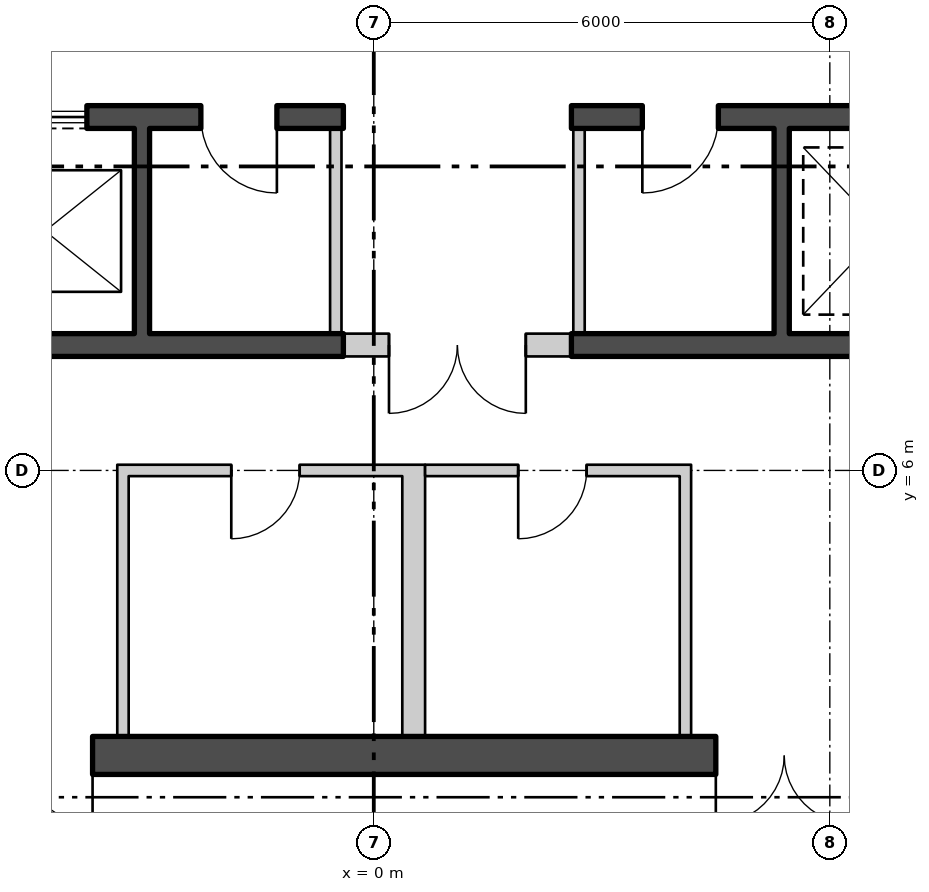
"""IFC4 building model, lengths in metres.
Left out: names, types, materials, properties, quantities, classifications, styles, units other than length and angle.
Written with IfcOpenShell. Run it as: python <this file> out.ifc"""

import sys

from ifc_helpers import new_model, si_unit, direction, frame, frame_2d, origin, place, context, subcontext, project, spatial, polyline, rectangle, outline, extrude, element, fill, save


model = new_model("IFC4")
c1 = context("Model", 3, precision=1e-05, world=origin(), true_north=direction((0.0, 1.0)))
c2 = subcontext(c1, "Body", "Model", "MODEL_VIEW")
j1 = project(units=[si_unit("LENGTHUNIT", "METRE"), si_unit("PLANEANGLEUNIT", "RADIAN")], contexts=[c1])
p1 = place(None, origin())
s1 = spatial("IfcSite", under=j1, at=p1, CompositionType="ELEMENT")
p2 = place(p1, origin())
s2 = spatial("IfcBuilding", under=s1, at=p2, CompositionType="ELEMENT")
p3 = place(p2, frame((0.0, 0.0, 163.2)))
s3 = spatial("IfcBuildingStorey", under=s2, at=p3, CompositionType="ELEMENT", Elevation=163.2)
p4 = place(p3, frame((-26.925, 12.951, -0.18), z_axis=(0.0, 0.0, 1.0), x_axis=(0.499999764979, -0.866025539474, 0.0)))
e1 = element("IfcWall", 1, at=p4, inside=s3, PredefinedType="SOLIDWALL", context=c2, shape_type="SweptSolid", body=[
    extrude(outline(polyline([(-0.13, -0.225), (45.87, -0.225), (45.61, 0.225), (0.13, 0.225), (-0.13, -0.225)])), origin(), (0.0, 0.0, 1.0), 3.68),
])
p5 = place(p4, frame((1.424, 0.0, 1.08)))
e2 = element("IfcOpeningElement", 2, at=p5, cuts=e1, PredefinedType="OPENING", context=c2, shape_type="SweptSolid", body=[
    extrude(rectangle(XDim=2.4, YDim=2.0, at=frame_2d((1.2, 1.0))), frame((0.0, 0.235, 0.0), z_axis=(0.0, -1.0, 0.0), x_axis=(1.0, 0.0, 0.0)), (0.0, 0.0, 1.0), 0.47),
])
p6 = place(p4, frame((5.893, 0.0, 1.08)))
e3 = element("IfcOpeningElement", 3, at=p6, cuts=e1, PredefinedType="OPENING", context=c2, shape_type="SweptSolid", body=[
    extrude(rectangle(XDim=2.4, YDim=2.0, at=frame_2d((1.2, 1.0))), frame((0.0, 0.235, 0.0), z_axis=(0.0, -1.0, 0.0), x_axis=(1.0, 0.0, 0.0)), (0.0, 0.0, 1.0), 0.47),
])
p7 = place(p4, frame((10.401, 0.0, 1.08)))
e4 = element("IfcOpeningElement", 4, at=p7, cuts=e1, PredefinedType="OPENING", context=c2, shape_type="SweptSolid", body=[
    extrude(rectangle(XDim=2.4, YDim=2.0, at=frame_2d((1.2, 1.0))), frame((0.0, 0.235, 0.0), z_axis=(0.0, -1.0, 0.0), x_axis=(1.0, 0.0, 0.0)), (0.0, 0.0, 1.0), 0.47),
])
p8 = place(p4, frame((14.909, 0.0, 1.08)))
e5 = element("IfcOpeningElement", 5, at=p8, cuts=e1, PredefinedType="OPENING", context=c2, shape_type="SweptSolid", body=[
    extrude(rectangle(XDim=2.4, YDim=2.0, at=frame_2d((1.2, 1.0))), frame((0.0, 0.235, 0.0), z_axis=(0.0, -1.0, 0.0), x_axis=(1.0, 0.0, 0.0)), (0.0, 0.0, 1.0), 0.47),
])
p9 = place(p4, frame((19.416, 0.0, 1.08)))
e6 = element("IfcOpeningElement", 6, at=p9, cuts=e1, PredefinedType="OPENING", context=c2, shape_type="SweptSolid", body=[
    extrude(rectangle(XDim=2.4, YDim=2.0, at=frame_2d((1.2, 1.0))), frame((0.0, 0.235, 0.0), z_axis=(0.0, -1.0, 0.0), x_axis=(1.0, 0.0, 0.0)), (0.0, 0.0, 1.0), 0.47),
])
p10 = place(p4, frame((23.924, 0.0, 1.08)))
e7 = element("IfcOpeningElement", 7, at=p10, cuts=e1, PredefinedType="OPENING", context=c2, shape_type="SweptSolid", body=[
    extrude(rectangle(XDim=2.4, YDim=2.0, at=frame_2d((1.2, 1.0))), frame((0.0, 0.235, 0.0), z_axis=(0.0, -1.0, 0.0), x_axis=(1.0, 0.0, 0.0)), (0.0, 0.0, 1.0), 0.47),
])
p11 = place(p4, frame((28.431, 0.0, 1.08)))
e8 = element("IfcOpeningElement", 8, at=p11, cuts=e1, PredefinedType="OPENING", context=c2, shape_type="SweptSolid", body=[
    extrude(rectangle(XDim=2.4, YDim=2.0, at=frame_2d((1.2, 1.0))), frame((0.0, 0.235, 0.0), z_axis=(0.0, -1.0, 0.0), x_axis=(1.0, 0.0, 0.0)), (0.0, 0.0, 1.0), 0.47),
])
p12 = place(p4, frame((32.939, 0.0, 1.08)))
e9 = element("IfcOpeningElement", 9, at=p12, cuts=e1, PredefinedType="OPENING", context=c2, shape_type="SweptSolid", body=[
    extrude(rectangle(XDim=2.4, YDim=2.0, at=frame_2d((1.2, 1.0))), frame((0.0, 0.235, 0.0), z_axis=(0.0, -1.0, 0.0), x_axis=(1.0, 0.0, 0.0)), (0.0, 0.0, 1.0), 0.47),
])
p13 = place(p4, frame((37.447, 0.0, 1.08)))
e10 = element("IfcOpeningElement", 10, at=p13, cuts=e1, PredefinedType="OPENING", context=c2, shape_type="SweptSolid", body=[
    extrude(rectangle(XDim=2.4, YDim=2.0, at=frame_2d((1.2, 1.0))), frame((0.0, 0.235, 0.0), z_axis=(0.0, -1.0, 0.0), x_axis=(1.0, 0.0, 0.0)), (0.0, 0.0, 1.0), 0.47),
])
p14 = place(p4, frame((41.916, 0.0, 1.08)))
e11 = element("IfcOpeningElement", 11, at=p14, cuts=e1, PredefinedType="OPENING", context=c2, shape_type="SweptSolid", body=[
    extrude(rectangle(XDim=2.4, YDim=2.0, at=frame_2d((1.2, 1.0))), frame((0.0, 0.235, 0.0), z_axis=(0.0, -1.0, 0.0), x_axis=(1.0, 0.0, 0.0)), (0.0, 0.0, 1.0), 0.47),
])
p15 = place(p3, frame((4.055, -26.661, -0.18), z_axis=(0.0, 0.0, 1.0), x_axis=(0.499999764979, 0.866025539474, 0.0)))
e12 = element("IfcWall", 12, at=p15, inside=s3, PredefinedType="SOLIDWALL", context=c2, shape_type="SweptSolid", body=[
    extrude(outline(polyline([(-0.13, -0.225), (45.87, -0.225), (45.61, 0.225), (0.13, 0.225), (-0.13, -0.225)])), origin(), (0.0, 0.0, 1.0), 3.68),
])
p16 = place(p15, frame((1.424, 0.0, 1.08)))
e13 = element("IfcOpeningElement", 13, at=p16, cuts=e12, PredefinedType="OPENING", context=c2, shape_type="SweptSolid", body=[
    extrude(rectangle(XDim=2.4, YDim=2.0, at=frame_2d((1.2, 1.0))), frame((0.0, 0.235, 0.0), z_axis=(0.0, -1.0, 0.0), x_axis=(1.0, 0.0, 0.0)), (0.0, 0.0, 1.0), 0.47),
])
p17 = place(p15, frame((5.893, 0.0, 1.08)))
e14 = element("IfcOpeningElement", 14, at=p17, cuts=e12, PredefinedType="OPENING", context=c2, shape_type="SweptSolid", body=[
    extrude(rectangle(XDim=2.4, YDim=2.0, at=frame_2d((1.2, 1.0))), frame((0.0, 0.235, 0.0), z_axis=(0.0, -1.0, 0.0), x_axis=(1.0, 0.0, 0.0)), (0.0, 0.0, 1.0), 0.47),
])
p18 = place(p15, frame((10.401, 0.0, 1.08)))
e15 = element("IfcOpeningElement", 15, at=p18, cuts=e12, PredefinedType="OPENING", context=c2, shape_type="SweptSolid", body=[
    extrude(rectangle(XDim=2.4, YDim=2.0, at=frame_2d((1.2, 1.0))), frame((0.0, 0.235, 0.0), z_axis=(0.0, -1.0, 0.0), x_axis=(1.0, 0.0, 0.0)), (0.0, 0.0, 1.0), 0.47),
])
p19 = place(p15, frame((14.909, 0.0, 1.08)))
e16 = element("IfcOpeningElement", 16, at=p19, cuts=e12, PredefinedType="OPENING", context=c2, shape_type="SweptSolid", body=[
    extrude(rectangle(XDim=2.4, YDim=2.0, at=frame_2d((1.2, 1.0))), frame((0.0, 0.235, 0.0), z_axis=(0.0, -1.0, 0.0), x_axis=(1.0, 0.0, 0.0)), (0.0, 0.0, 1.0), 0.47),
])
p20 = place(p15, frame((19.416, 0.0, 1.08)))
e17 = element("IfcOpeningElement", 17, at=p20, cuts=e12, PredefinedType="OPENING", context=c2, shape_type="SweptSolid", body=[
    extrude(rectangle(XDim=2.4, YDim=2.0, at=frame_2d((1.2, 1.0))), frame((0.0, 0.235, 0.0), z_axis=(0.0, -1.0, 0.0), x_axis=(1.0, 0.0, 0.0)), (0.0, 0.0, 1.0), 0.47),
])
p21 = place(p15, frame((23.924, 0.0, 1.08)))
e18 = element("IfcOpeningElement", 18, at=p21, cuts=e12, PredefinedType="OPENING", context=c2, shape_type="SweptSolid", body=[
    extrude(rectangle(XDim=2.4, YDim=2.0, at=frame_2d((1.2, 1.0))), frame((0.0, 0.235, 0.0), z_axis=(0.0, -1.0, 0.0), x_axis=(1.0, 0.0, 0.0)), (0.0, 0.0, 1.0), 0.47),
])
p22 = place(p15, frame((28.431, 0.0, 1.08)))
e19 = element("IfcOpeningElement", 19, at=p22, cuts=e12, PredefinedType="OPENING", context=c2, shape_type="SweptSolid", body=[
    extrude(rectangle(XDim=2.4, YDim=2.0, at=frame_2d((1.2, 1.0))), frame((0.0, 0.235, 0.0), z_axis=(0.0, -1.0, 0.0), x_axis=(1.0, 0.0, 0.0)), (0.0, 0.0, 1.0), 0.47),
])
p23 = place(p15, frame((32.939, 0.0, 1.08)))
e20 = element("IfcOpeningElement", 20, at=p23, cuts=e12, PredefinedType="OPENING", context=c2, shape_type="SweptSolid", body=[
    extrude(rectangle(XDim=2.4, YDim=2.0, at=frame_2d((1.2, 1.0))), frame((0.0, 0.235, 0.0), z_axis=(0.0, -1.0, 0.0), x_axis=(1.0, 0.0, 0.0)), (0.0, 0.0, 1.0), 0.47),
])
p24 = place(p15, frame((37.447, 0.0, 1.08)))
e21 = element("IfcOpeningElement", 21, at=p24, cuts=e12, PredefinedType="OPENING", context=c2, shape_type="SweptSolid", body=[
    extrude(rectangle(XDim=2.4, YDim=2.0, at=frame_2d((1.2, 1.0))), frame((0.0, 0.235, 0.0), z_axis=(0.0, -1.0, 0.0), x_axis=(1.0, 0.0, 0.0)), (0.0, 0.0, 1.0), 0.47),
])
p25 = place(p15, frame((41.916, 0.0, 1.08)))
e22 = element("IfcOpeningElement", 22, at=p25, cuts=e12, PredefinedType="OPENING", context=c2, shape_type="SweptSolid", body=[
    extrude(rectangle(XDim=2.4, YDim=2.0, at=frame_2d((1.2, 1.0))), frame((0.0, 0.235, 0.0), z_axis=(0.0, -1.0, 0.0), x_axis=(1.0, 0.0, 0.0)), (0.0, 0.0, 1.0), 0.47),
])
p26 = place(p3, frame((-16.2, 2.25, 0.0), z_axis=(0.0, 0.0, 1.0), x_axis=(1.0, 0.0, 0.0)))
e23 = element("IfcWall", 23, at=p26, inside=s3, PredefinedType="SHEAR", context=c2, shape_type="SweptSolid", body=[
    extrude(rectangle(XDim=32.4, YDim=0.5, at=frame_2d((16.2, 0.0))), origin(), (0.0, 0.0, 1.0), 3.7),
])
p27 = place(p26, frame((10.7, 0.0, 0.0)))
e24 = element("IfcOpeningElement", 24, at=p27, cuts=e23, PredefinedType="OPENING", context=c2, shape_type="SweptSolid", body=[
    extrude(rectangle(XDim=1.8, YDim=2.4, at=frame_2d((0.9, 1.2))), frame((0.0, 0.26, 0.0), z_axis=(0.0, -1.0, 0.0), x_axis=(1.0, 0.0, 0.0)), (0.0, 0.0, 1.0), 0.52),
])
p28 = place(p26, frame((20.7, 0.0, 0.0)))
e25 = element("IfcOpeningElement", 25, at=p28, cuts=e23, PredefinedType="OPENING", context=c2, shape_type="SweptSolid", body=[
    extrude(rectangle(XDim=1.8, YDim=2.4, at=frame_2d((0.9, 1.2))), frame((0.0, 0.26, 0.0), z_axis=(0.0, -1.0, 0.0), x_axis=(1.0, 0.0, 0.0)), (0.0, 0.0, 1.0), 0.52),
])
p29 = place(p3, frame((-10.7, 10.65, 0.0), z_axis=(0.0, 0.0, 1.0), x_axis=(1.0, 0.0, 0.0)))
e26 = element("IfcWall", 26, at=p29, inside=s3, PredefinedType="SHEAR", context=c2, shape_type="SweptSolid", body=[
    extrude(rectangle(XDim=10.3, YDim=0.3, at=frame_2d((5.15, 0.0))), origin(), (0.0, 0.0, 1.0), 3.7),
])
p30 = place(p29, frame((0.675, 0.0, 0.0)))
e27 = element("IfcOpeningElement", 27, at=p30, cuts=e26, PredefinedType="OPENING", context=c2, shape_type="SweptSolid", body=[
    extrude(rectangle(XDim=1.1, YDim=2.1, at=frame_2d((0.55, 1.05))), frame((0.0, 0.16, 0.0), z_axis=(0.0, -1.0, 0.0), x_axis=(1.0, 0.0, 0.0)), (0.0, 0.0, 1.0), 0.32),
])
p31 = place(p29, frame((3.275, 0.0, 0.0)))
e28 = element("IfcOpeningElement", 28, at=p31, cuts=e26, PredefinedType="OPENING", context=c2, shape_type="SweptSolid", body=[
    extrude(rectangle(XDim=1.1, YDim=2.1, at=frame_2d((0.55, 1.05))), frame((0.0, 0.16, 0.0), z_axis=(0.0, -1.0, 0.0), x_axis=(1.0, 0.0, 0.0)), (0.0, 0.0, 1.0), 0.32),
])
p32 = place(p29, frame((5.825, 0.0, 0.0)))
e29 = element("IfcOpeningElement", 29, at=p32, cuts=e26, PredefinedType="OPENING", context=c2, shape_type="SweptSolid", body=[
    extrude(rectangle(XDim=1.1, YDim=2.1, at=frame_2d((0.55, 1.05))), frame((0.0, 0.16, 0.0), z_axis=(0.0, -1.0, 0.0), x_axis=(1.0, 0.0, 0.0)), (0.0, 0.0, 1.0), 0.32),
])
p33 = place(p29, frame((8.425, 0.0, 0.0)))
e30 = element("IfcOpeningElement", 30, at=p33, cuts=e26, PredefinedType="OPENING", context=c2, shape_type="SweptSolid", body=[
    extrude(rectangle(XDim=1.0, YDim=2.1, at=frame_2d((0.5, 1.05))), frame((0.0, 0.16, 0.0), z_axis=(0.0, -1.0, 0.0), x_axis=(1.0, 0.0, 0.0)), (0.0, 0.0, 1.0), 0.32),
])
p34 = place(p3, frame((-10.7, 7.65, 0.0), z_axis=(0.0, 0.0, 1.0), x_axis=(1.0, 0.0, 0.0)))
e31 = element("IfcWall", 31, at=p34, inside=s3, PredefinedType="SHEAR", context=c2, shape_type="SweptSolid", body=[
    extrude(rectangle(XDim=10.3, YDim=0.3, at=frame_2d((5.15, 0.0))), origin(), (0.0, 0.0, 1.0), 3.7),
])
p35 = place(p3, frame((2.6, 10.65, 0.0), z_axis=(0.0, 0.0, 1.0), x_axis=(1.0, 0.0, 0.0)))
e32 = element("IfcWall", 32, at=p35, inside=s3, PredefinedType="SHEAR", context=c2, shape_type="SweptSolid", body=[
    extrude(rectangle(XDim=8.1, YDim=0.3, at=frame_2d((4.05, 0.0))), origin(), (0.0, 0.0, 1.0), 3.7),
])
p36 = place(p35, frame((0.933, 0.0, 0.0)))
e33 = element("IfcOpeningElement", 33, at=p36, cuts=e32, PredefinedType="OPENING", context=c2, shape_type="SweptSolid", body=[
    extrude(rectangle(XDim=1.0, YDim=2.1, at=frame_2d((0.5, 1.05))), frame((0.0, 0.16, 0.0), z_axis=(0.0, -1.0, 0.0), x_axis=(1.0, 0.0, 0.0)), (0.0, 0.0, 1.0), 0.32),
])
p37 = place(p3, frame((2.6, 7.65, 0.0), z_axis=(0.0, 0.0, 1.0), x_axis=(1.0, 0.0, 0.0)))
e34 = element("IfcWall", 34, at=p37, inside=s3, PredefinedType="SHEAR", context=c2, shape_type="SweptSolid", body=[
    extrude(rectangle(XDim=8.1, YDim=0.3, at=frame_2d((4.05, 0.0))), origin(), (0.0, 0.0, 1.0), 3.7),
])
p38 = place(p3, frame((-3.05, 7.8, 0.0), z_axis=(0.0, 0.0, 1.0), x_axis=(0.0, 1.0, 0.0)))
e35 = element("IfcWall", 35, at=p38, inside=s3, PredefinedType="SHEAR", context=c2, shape_type="SweptSolid", body=[
    extrude(rectangle(XDim=2.7, YDim=0.2, at=frame_2d((1.35, 0.0))), origin(), (0.0, 0.0, 1.0), 3.7),
])
for number, where, z_axis, x_axis in (
    (36, (-0.5, 7.8, 0.0), (0.0, 0.0, 1.0), (0.0, 1.0, 0.0)),
    (37, (2.7, 7.8, 0.0), (0.0, 0.0, 1.0), (0.0, 1.0, 0.0)),
):
    element("IfcWall", number, at=place(p3, frame(where, z_axis=z_axis, x_axis=x_axis)), inside=s3, PredefinedType="PARTITIONING", context=c2, shape_type="SweptSolid", body=[
        extrude(rectangle(XDim=2.7, YDim=0.15, at=frame_2d((1.35, 0.0))), origin(), (0.0, 0.0, 1.0), 3.7),
    ])
p39 = place(p3, frame((5.367, 7.8, 0.0), z_axis=(0.0, 0.0, 1.0), x_axis=(0.0, 1.0, 0.0)))
e38 = element("IfcWall", 38, at=p39, inside=s3, PredefinedType="SHEAR", context=c2, shape_type="SweptSolid", body=[
    extrude(rectangle(XDim=2.7, YDim=0.2, at=frame_2d((1.35, 0.0))), origin(), (0.0, 0.0, 1.0), 3.7),
])
for number, where, z_axis, x_axis in (
    (39, (-3.3, 2.5, 0.0), (0.0, 0.0, 1.0), (0.0, 1.0, 0.0)),
    (40, (0.45, 2.5, 0.0), (0.0, 0.0, 1.0), (0.0, 1.0, 0.0)),
):
    element("IfcWall", number, at=place(p3, frame(where, z_axis=z_axis, x_axis=x_axis)), inside=s3, PredefinedType="PARTITIONING", context=c2, shape_type="SweptSolid", body=[
        extrude(rectangle(XDim=3.575, YDim=0.15, at=frame_2d((1.788, 0.0))), origin(), (0.0, 0.0, 1.0), 3.7),
    ])
p40 = place(p3, frame((-3.225, 6.0, 0.0), z_axis=(0.0, 0.0, 1.0), x_axis=(1.0, 0.0, 0.0)))
e41 = element("IfcWall", 41, at=p40, inside=s3, PredefinedType="PARTITIONING", context=c2, shape_type="SweptSolid", body=[
    extrude(rectangle(XDim=3.6, YDim=0.15, at=frame_2d((1.8, 0.0))), origin(), (0.0, 0.0, 1.0), 3.7),
])
p41 = place(p40, frame((1.35, 0.0, 0.0)))
e42 = element("IfcOpeningElement", 42, at=p41, cuts=e41, PredefinedType="OPENING", context=c2, shape_type="SweptSolid", body=[
    extrude(rectangle(XDim=0.9, YDim=2.1, at=frame_2d((0.45, 1.05))), frame((0.0, 0.085, 0.0), z_axis=(0.0, -1.0, 0.0), x_axis=(1.0, 0.0, 0.0)), (0.0, 0.0, 1.0), 0.17),
])
for number, where, z_axis, x_axis in (
    (43, (0.6, 2.5, 0.0), (0.0, 0.0, 1.0), (0.0, 1.0, 0.0)),
    (44, (4.1, 2.5, 0.0), (0.0, 0.0, 1.0), (0.0, 1.0, 0.0)),
):
    element("IfcWall", number, at=place(p3, frame(where, z_axis=z_axis, x_axis=x_axis)), inside=s3, PredefinedType="PARTITIONING", context=c2, shape_type="SweptSolid", body=[
        extrude(rectangle(XDim=3.575, YDim=0.15, at=frame_2d((1.788, 0.0))), origin(), (0.0, 0.0, 1.0), 3.7),
    ])
p42 = place(p3, frame((0.675, 6.0, 0.0), z_axis=(0.0, 0.0, 1.0), x_axis=(1.0, 0.0, 0.0)))
e45 = element("IfcWall", 45, at=p42, inside=s3, PredefinedType="PARTITIONING", context=c2, shape_type="SweptSolid", body=[
    extrude(rectangle(XDim=3.35, YDim=0.15, at=frame_2d((1.675, 0.0))), origin(), (0.0, 0.0, 1.0), 3.7),
])
p43 = place(p42, frame((1.225, 0.0, 0.0)))
e46 = element("IfcOpeningElement", 46, at=p43, cuts=e45, PredefinedType="OPENING", context=c2, shape_type="SweptSolid", body=[
    extrude(rectangle(XDim=0.9, YDim=2.1, at=frame_2d((0.45, 1.05))), frame((0.0, 0.085, 0.0), z_axis=(0.0, -1.0, 0.0), x_axis=(1.0, 0.0, 0.0)), (0.0, 0.0, 1.0), 0.17),
])
p44 = place(p3, frame((-0.4, 7.65, 0.0), z_axis=(0.0, 0.0, 1.0), x_axis=(1.0, 0.0, 0.0)))
e47 = element("IfcWall", 47, at=p44, inside=s3, PredefinedType="PARTITIONING", context=c2, shape_type="SweptSolid", body=[
    extrude(rectangle(XDim=3.0, YDim=0.3, at=frame_2d((1.5, 0.0))), origin(), (0.0, 0.0, 1.0), 3.7),
])
p45 = place(p44, frame((0.6, 0.0, 0.0)))
e48 = element("IfcOpeningElement", 48, at=p45, cuts=e47, PredefinedType="OPENING", context=c2, shape_type="SweptSolid", body=[
    extrude(rectangle(XDim=1.8, YDim=2.4, at=frame_2d((0.9, 1.2))), frame((0.0, 0.16, 0.0), z_axis=(0.0, -1.0, 0.0), x_axis=(1.0, 0.0, 0.0)), (0.0, 0.0, 1.0), 0.32),
])
p46 = place(p32, origin())
e49 = element("IfcDoor", 49, at=p46, inside=s3, OperationType="SLIDING_TO_LEFT", PredefinedType="DOOR", context=c2, shape_type="SweptSolid", body=[
    extrude(rectangle(XDim=1.1, YDim=2.1, at=frame_2d((0.55, 1.05))), frame((0.0, 0.025, 0.0), z_axis=(0.0, -1.0, 0.0), x_axis=(1.0, 0.0, 0.0)), (0.0, 0.0, 1.0), 0.05),
])
fill(e29, e49)
p47 = place(p33, origin())
e50 = element("IfcDoor", 50, at=p47, inside=s3, OperationType="SINGLE_SWING_RIGHT", PredefinedType="DOOR", context=c2, shape_type="SweptSolid", body=[
    extrude(rectangle(XDim=1.0, YDim=2.1, at=frame_2d((0.5, 1.05))), frame((0.0, 0.025, 0.0), z_axis=(0.0, -1.0, 0.0), x_axis=(1.0, 0.0, 0.0)), (0.0, 0.0, 1.0), 0.05),
])
fill(e30, e50)
p48 = place(p36, origin())
e51 = element("IfcDoor", 51, at=p48, inside=s3, OperationType="SINGLE_SWING_LEFT", PredefinedType="DOOR", context=c2, shape_type="SweptSolid", body=[
    extrude(rectangle(XDim=1.0, YDim=2.1, at=frame_2d((0.5, 1.05))), frame((0.0, 0.025, 0.0), z_axis=(0.0, -1.0, 0.0), x_axis=(1.0, 0.0, 0.0)), (0.0, 0.0, 1.0), 0.05),
])
fill(e33, e51)
p49 = place(p41, origin())
e52 = element("IfcDoor", 52, at=p49, inside=s3, OperationType="SINGLE_SWING_LEFT", PredefinedType="DOOR", context=c2, shape_type="SweptSolid", body=[
    extrude(rectangle(XDim=0.9, YDim=2.1, at=frame_2d((0.45, 1.05))), frame((0.0, 0.025, 0.0), z_axis=(0.0, -1.0, 0.0), x_axis=(1.0, 0.0, 0.0)), (0.0, 0.0, 1.0), 0.05),
])
fill(e42, e52)
p50 = place(p43, origin())
e53 = element("IfcDoor", 53, at=p50, inside=s3, OperationType="SINGLE_SWING_LEFT", PredefinedType="DOOR", context=c2, shape_type="SweptSolid", body=[
    extrude(rectangle(XDim=0.9, YDim=2.1, at=frame_2d((0.45, 1.05))), frame((0.0, 0.025, 0.0), z_axis=(0.0, -1.0, 0.0), x_axis=(1.0, 0.0, 0.0)), (0.0, 0.0, 1.0), 0.05),
])
fill(e46, e53)
p51 = place(p45, origin())
e54 = element("IfcDoor", 54, at=p51, inside=s3, OperationType="DOUBLE_DOOR_SINGLE_SWING", PredefinedType="DOOR", context=c2, shape_type="SweptSolid", body=[
    extrude(rectangle(XDim=1.8, YDim=2.4, at=frame_2d((0.9, 1.2))), frame((0.0, 0.025, 0.0), z_axis=(0.0, -1.0, 0.0), x_axis=(1.0, 0.0, 0.0)), (0.0, 0.0, 1.0), 0.05),
])
fill(e48, e54)
p52 = place(p27, origin())
e55 = element("IfcDoor", 55, at=p52, inside=s3, OperationType="DOUBLE_DOOR_SINGLE_SWING", PredefinedType="DOOR", context=c2, shape_type="SweptSolid", body=[
    extrude(rectangle(XDim=1.8, YDim=2.4, at=frame_2d((0.9, 1.2))), frame((0.0, 0.025, 0.0), z_axis=(0.0, -1.0, 0.0), x_axis=(1.0, 0.0, 0.0)), (0.0, 0.0, 1.0), 0.05),
])
fill(e24, e55)
p53 = place(p28, origin())
e56 = element("IfcDoor", 56, at=p53, inside=s3, OperationType="DOUBLE_DOOR_SINGLE_SWING", PredefinedType="DOOR", context=c2, shape_type="SweptSolid", body=[
    extrude(rectangle(XDim=1.8, YDim=2.4, at=frame_2d((0.9, 1.2))), frame((0.0, 0.025, 0.0), z_axis=(0.0, -1.0, 0.0), x_axis=(1.0, 0.0, 0.0)), (0.0, 0.0, 1.0), 0.05),
])
fill(e25, e56)
save(model, sys.argv[1])
